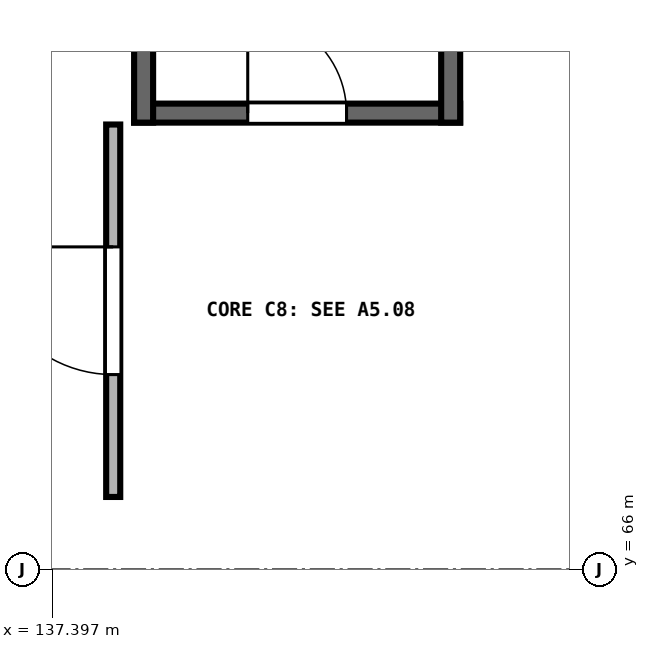
"""IFC4 building model, lengths in metres.
Left out: names, types, materials, properties, quantities, classifications, styles, units other than length and angle.
Written with IfcOpenShell. Run it as: python <this file> out.ifc"""

import sys

from ifc_helpers import new_model, si_unit, direction, frame, frame_2d, origin, place, context, subcontext, project, spatial, rectangle, extrude, element, fill, save


model = new_model("IFC4")
c1 = context("Model", 3, precision=1e-05, world=origin(), true_north=direction((0.0, 1.0)))
c2 = subcontext(c1, "Body", "Model", "MODEL_VIEW")
j1 = project(units=[si_unit("LENGTHUNIT", "METRE"), si_unit("PLANEANGLEUNIT", "RADIAN")], contexts=[c1])
p1 = place(None, origin())
s1 = spatial("IfcSite", under=j1, at=p1, CompositionType="ELEMENT")
p2 = place(p1, origin())
s2 = spatial("IfcBuilding", under=s1, at=p2, CompositionType="ELEMENT")
p3 = place(p2, frame((0.0, 0.0, -4.8)))
s3 = spatial("IfcBuildingStorey", under=s2, at=p3, CompositionType="ELEMENT", Elevation=-4.8)
p4 = place(p3, frame((138.475, 72.0, 0.0), z_axis=(0.0, 0.0, 1.0), x_axis=(1.0, 0.0, 0.0)))
e1 = element("IfcWall", 1, at=p4, inside=s3, PredefinedType="SHEAR", context=c2, shape_type="SweptSolid", body=[
    extrude(rectangle(XDim=4.29, YDim=0.25, at=frame_2d((2.145, 0.0))), origin(), (0.0, 0.0, 1.0), 4.5),
])
p5 = place(p4, frame((1.495, 0.0, 0.0)))
e2 = element("IfcOpeningElement", 2, at=p5, cuts=e1, PredefinedType="OPENING", context=c2, shape_type="SweptSolid", body=[
    extrude(rectangle(XDim=1.3, YDim=2.18, at=frame_2d((0.65, 1.09))), frame((0.0, 0.135, 0.0), z_axis=(0.0, -1.0, 0.0), x_axis=(1.0, 0.0, 0.0)), (0.0, 0.0, 1.0), 0.27),
])
for number, where, z_axis, x_axis in (
    (3, (138.6, 71.875, 0.0), (0.0, 0.0, 1.0), (0.0, 1.0, 0.0)),
    (4, (142.64, 71.875, 0.0), (0.0, 0.0, 1.0), (0.0, 1.0, 0.0)),
):
    element("IfcWall", number, at=place(p3, frame(where, z_axis=z_axis, x_axis=x_axis)), inside=s3, PredefinedType="SHEAR", context=c2, shape_type="SweptSolid", body=[
        extrude(rectangle(XDim=11.09, YDim=0.25, at=frame_2d((5.545, 0.0))), origin(), (0.0, 0.0, 1.0), 4.5),
    ])
p6 = place(p3, frame((138.2, 66.95, 0.0), z_axis=(0.0, 0.0, 1.0), x_axis=(0.0, 1.0, 0.0)))
e5 = element("IfcWall", 5, at=p6, inside=s3, PredefinedType="PARTITIONING", context=c2, shape_type="SweptSolid", body=[
    extrude(rectangle(XDim=4.9, YDim=0.185, at=frame_2d((2.45, 0.0))), origin(), (0.0, 0.0, 1.0), 4.45),
])
p7 = place(p6, frame((1.61, 0.0, 0.0)))
e6 = element("IfcOpeningElement", 6, at=p7, cuts=e5, PredefinedType="OPENING", context=c2, shape_type="SweptSolid", body=[
    extrude(rectangle(XDim=1.68, YDim=2.25, at=frame_2d((0.84, 1.125))), frame((0.0, 0.103, 0.0), z_axis=(0.0, -1.0, 0.0), x_axis=(1.0, 0.0, 0.0)), (0.0, 0.0, 1.0), 0.205),
])
p8 = place(p5, origin())
e7 = element("IfcDoor", 7, at=p8, inside=s3, OperationType="SINGLE_SWING_LEFT", PredefinedType="DOOR", context=c2, shape_type="SweptSolid", body=[
    extrude(rectangle(XDim=1.3, YDim=2.18, at=frame_2d((0.65, 1.09))), frame((0.0, 0.025, 0.0), z_axis=(0.0, -1.0, 0.0), x_axis=(1.0, 0.0, 0.0)), (0.0, 0.0, 1.0), 0.05),
])
fill(e2, e7)
p9 = place(p7, origin())
e8 = element("IfcDoor", 8, at=p9, inside=s3, OperationType="SINGLE_SWING_RIGHT", PredefinedType="DOOR", context=c2, shape_type="SweptSolid", body=[
    extrude(rectangle(XDim=1.68, YDim=2.25, at=frame_2d((0.84, 1.125))), frame((0.0, 0.025, 0.0), z_axis=(0.0, -1.0, 0.0), x_axis=(1.0, 0.0, 0.0)), (0.0, 0.0, 1.0), 0.05),
])
fill(e6, e8)
save(model, sys.argv[1])
